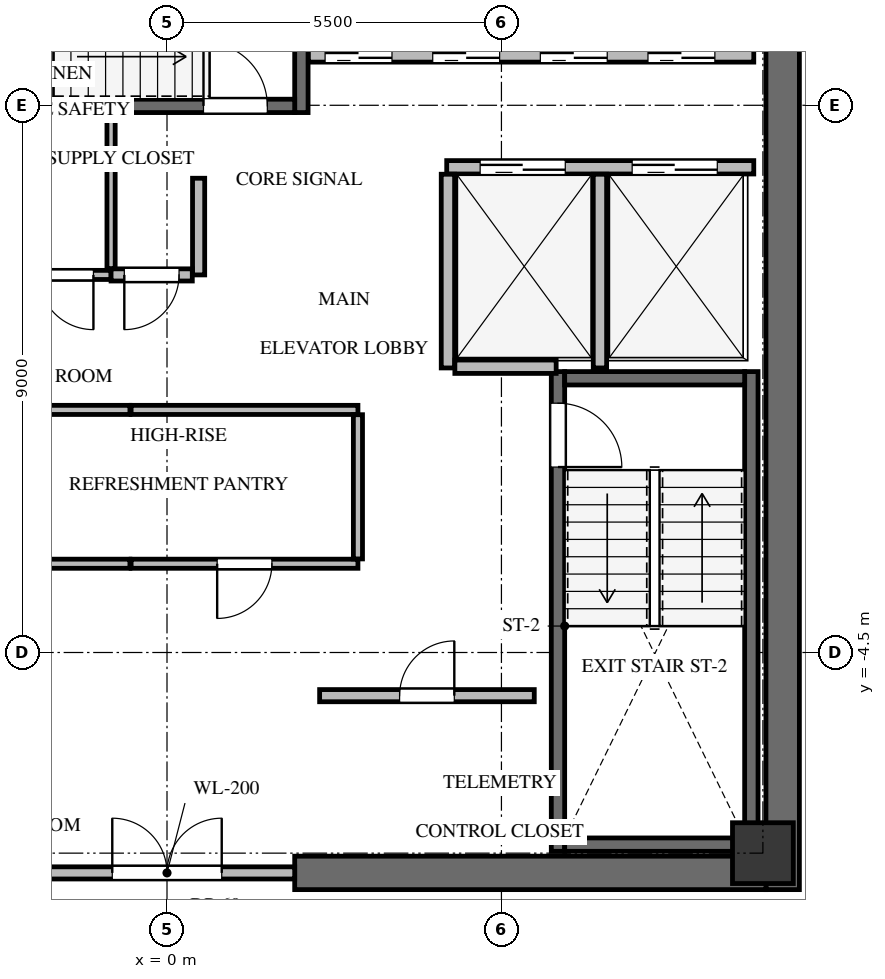
"""IFC4 building model, lengths in metres.
Left out: names, types, materials, properties, quantities, classifications, styles, units other than length and angle.
Written with IfcOpenShell. Run it as: python <this file> out.ifc"""

import sys

from ifc_helpers import new_model, si_unit, direction, frame, frame_2d, origin, origin_2d, place, context, subcontext, project, spatial, rectangle, extrude, source, transform, mapped, element, fill, save


model = new_model("IFC4")
c1 = context("Model", 3, precision=1e-05, world=origin(), true_north=direction((0.0, 1.0)))
c2 = subcontext(c1, "Body", "Model", "MODEL_VIEW")
j1 = project(units=[si_unit("LENGTHUNIT", "METRE"), si_unit("PLANEANGLEUNIT", "RADIAN")], contexts=[c1])
p1 = place(None, origin())
s1 = spatial("IfcSite", under=j1, at=p1, CompositionType="ELEMENT")
p2 = place(p1, origin())
s2 = spatial("IfcBuilding", under=s1, at=p2, CompositionType="ELEMENT")
p3 = place(p2, frame((0.0, 0.0, 234.8)))
s3 = spatial("IfcBuildingStorey", under=s2, at=p3, CompositionType="ELEMENT", Elevation=234.8)
p4 = place(p3, frame((10.125, -8.4, 0.0), z_axis=(0.0, 0.0, 1.0), x_axis=(0.0, 1.0, 0.0)))
e1 = element("IfcWall", 1, at=p4, inside=s3, PredefinedType="SHEAR", context=c2, shape_type="SweptSolid", body=[
    extrude(rectangle(XDim=16.8, YDim=0.55, at=frame_2d((8.4, 0.0))), origin(), (0.0, 0.0, 1.0), 3.3),
])
p5 = place(p3, frame((2.1, -8.125, 0.0), z_axis=(0.0, 0.0, 1.0), x_axis=(1.0, 0.0, 0.0)))
e2 = element("IfcWall", 2, at=p5, inside=s3, PredefinedType="SHEAR", context=c2, shape_type="SweptSolid", body=[
    extrude(rectangle(XDim=7.75, YDim=0.55, at=frame_2d((3.875, 0.0))), origin(), (0.0, 0.0, 1.0), 3.3),
])
p6 = place(p3, frame((9.61, -7.77, -0.24), z_axis=(0.0, 0.0, 1.0), x_axis=(0.0, 1.0, 0.0)))
e3 = element("IfcWall", 3, at=p6, inside=s3, PredefinedType="SHEAR", context=c2, shape_type="SweptSolid", body=[
    extrude(rectangle(XDim=7.89, YDim=0.22, at=frame_2d((3.945, 0.0))), origin(), (0.0, 0.0, 1.0), 3.3),
])
p7 = place(p3, frame((6.43, 0.12, -0.24), z_axis=(0.0, 0.0, 1.0), x_axis=(0.0, -1.0, 0.0)))
e4 = element("IfcWall", 4, at=p7, inside=s3, PredefinedType="SHEAR", context=c2, shape_type="SweptSolid", body=[
    extrude(rectangle(XDim=7.89, YDim=0.22, at=frame_2d((3.945, 0.0))), origin(), (0.0, 0.0, 1.0), 3.3),
])
p8 = place(p7, frame((0.52, 0.0, 0.0)))
e5 = element("IfcOpeningElement", 5, at=p8, cuts=e4, PredefinedType="OPENING", context=c2, shape_type="SweptSolid", body=[
    extrude(rectangle(XDim=1.05, YDim=2.15, at=frame_2d((0.525, 1.075))), frame((0.0, 0.12, 0.0), z_axis=(0.0, -1.0, 0.0), x_axis=(1.0, 0.0, 0.0)), (0.0, 0.0, 1.0), 0.24),
])
for number, where, z_axis, x_axis in (
    (6, (6.54, -7.66, -0.24), (0.0, 0.0, 1.0), (1.0, 0.0, 0.0)),
    (7, (9.5, 0.01, -0.24), (0.0, 0.0, 1.0), (-1.0, 0.0, 0.0)),
):
    element("IfcWall", number, at=place(p3, frame(where, z_axis=z_axis, x_axis=x_axis)), inside=s3, PredefinedType="SHEAR", context=c2, shape_type="SweptSolid", body=[
        extrude(rectangle(XDim=2.96, YDim=0.22, at=frame_2d((1.48, 0.0))), origin(), (0.0, 0.0, 1.0), 3.3),
    ])
p9 = place(p3, frame((2.21, 4.38, -0.24), z_axis=(0.0, 0.0, 1.0), x_axis=(0.0, 1.0, 0.0)))
e8 = element("IfcWall", 8, at=p9, inside=s3, PredefinedType="SHEAR", context=c2, shape_type="SweptSolid", body=[
    extrude(rectangle(XDim=3.4, YDim=0.22, at=frame_2d((1.7, 0.0))), origin(), (0.0, 0.0, 1.0), 3.3),
])
p10 = place(p3, frame((-5.25, 4.49, -0.24), z_axis=(0.0, 0.0, 1.0), x_axis=(1.0, 0.0, 0.0)))
e9 = element("IfcWall", 9, at=p10, inside=s3, PredefinedType="SHEAR", context=c2, shape_type="SweptSolid", body=[
    extrude(rectangle(XDim=7.35, YDim=0.22, at=frame_2d((3.675, 0.0))), origin(), (0.0, 0.0, 1.0), 3.3),
])
p11 = place(p10, frame((5.85, 0.0, 0.0)))
e10 = element("IfcOpeningElement", 10, at=p11, cuts=e9, PredefinedType="OPENING", context=c2, shape_type="SweptSolid", body=[
    extrude(rectangle(XDim=1.05, YDim=2.15, at=frame_2d((0.525, 1.075))), frame((0.0, 0.12, 0.0), z_axis=(0.0, -1.0, 0.0), x_axis=(1.0, 0.0, 0.0)), (0.0, 0.0, 1.0), 0.24),
])
m1 = source(origin(), c2, "Body", "SweptSolid", [
    extrude(rectangle(XDim=1.0, YDim=1.0, at=origin_2d()), origin(), (0.0, 0.0, 1.0), 3.3),
])
p12 = place(p3, frame((9.8, -7.8, -0.24), z_axis=(0.0, 0.0, 1.0), x_axis=(1.0, 0.0, 0.0)))
e11 = element("IfcColumn", 11, at=p12, inside=s3, PredefinedType="COLUMN", context=c2, shape_type="MappedRepresentation", body=[
    mapped(m1, transform((0.0, 0.0, 0.0), x_axis=(1.0, 0.0, 0.0), y_axis=(0.0, 1.0, 0.0), z_axis=(0.0, 0.0, 1.0), scale=1.0)),
])
p13 = place(p3, frame((-2.1, -8.125, 0.0), z_axis=(0.0, 0.0, 1.0), x_axis=(1.0, 0.0, 0.0)))
e12 = element("IfcWall", 12, at=p13, inside=s3, PredefinedType="SOLIDWALL", context=c2, shape_type="SweptSolid", body=[
    extrude(rectangle(XDim=4.2, YDim=0.2, at=frame_2d((2.1, 0.0))), origin(), (0.0, 0.0, 1.0), 3.045),
])
p14 = place(p13, frame((1.2, 0.0, 0.0)))
e13 = element("IfcOpeningElement", 13, at=p14, cuts=e12, PredefinedType="OPENING", context=c2, shape_type="SweptSolid", body=[
    extrude(rectangle(XDim=1.8, YDim=2.15, at=frame_2d((0.9, 1.075))), frame((0.0, 0.11, 0.0), z_axis=(0.0, -1.0, 0.0), x_axis=(1.0, 0.0, 0.0)), (0.0, 0.0, 1.0), 0.22),
])
p15 = place(p3, frame((4.6, 3.48, 0.0), z_axis=(0.0, 0.0, 1.0), x_axis=(1.0, 0.0, 0.0)))
e14 = element("IfcWall", 14, at=p15, inside=s3, PredefinedType="SOLIDWALL", context=c2, shape_type="SweptSolid", body=[
    extrude(rectangle(XDim=5.05, YDim=0.22, at=frame_2d((2.525, 0.0))), origin(), (0.0, 0.0, 1.0), 3.045),
])
p16 = place(p15, frame((0.55, 0.0, 0.0)))
e15 = element("IfcOpeningElement", 15, at=p16, cuts=e14, PredefinedType="OPENING", context=c2, shape_type="SweptSolid", body=[
    extrude(rectangle(XDim=1.4, YDim=2.15, at=frame_2d((0.7, 1.075))), frame((0.0, 0.12, 0.0), z_axis=(0.0, -1.0, 0.0), x_axis=(1.0, 0.0, 0.0)), (0.0, 0.0, 1.0), 0.24),
])
p17 = place(p15, frame((3.05, 0.0, 0.0)))
e16 = element("IfcOpeningElement", 16, at=p17, cuts=e14, PredefinedType="OPENING", context=c2, shape_type="SweptSolid", body=[
    extrude(rectangle(XDim=1.4, YDim=2.15, at=frame_2d((0.7, 1.075))), frame((0.0, 0.12, 0.0), z_axis=(0.0, -1.0, 0.0), x_axis=(1.0, 0.0, 0.0)), (0.0, 0.0, 1.0), 0.24),
])
for number, where, z_axis, x_axis in (
    (17, (4.62, 0.18, 0.0), (0.0, 0.0, 1.0), (0.0, 1.0, 0.0)),
    (18, (7.12, 0.18, 0.0), (0.0, 0.0, 1.0), (0.0, 1.0, 0.0)),
):
    element("IfcWall", number, at=place(p3, frame(where, z_axis=z_axis, x_axis=x_axis)), inside=s3, PredefinedType="SOLIDWALL", context=c2, shape_type="SweptSolid", body=[
        extrude(rectangle(XDim=3.186, YDim=0.22, at=frame_2d((1.593, 0.0))), origin(), (0.0, 0.0, 1.0), 3.045),
    ])
p18 = place(p3, frame((4.734, 0.2, 0.0), z_axis=(0.0, 0.0, 1.0), x_axis=(1.0, 0.0, 0.0)))
e19 = element("IfcWall", 19, at=p18, inside=s3, PredefinedType="SOLIDWALL", context=c2, shape_type="SweptSolid", body=[
    extrude(rectangle(XDim=1.666, YDim=0.22, at=frame_2d((0.833, 0.0))), origin(), (0.0, 0.0, 1.0), 3.045),
])
p19 = place(p3, frame((2.325, 5.32, 0.0), z_axis=(0.0, 0.0, 1.0), x_axis=(1.0, 0.0, 0.0)))
e20 = element("IfcWall", 20, at=p19, inside=s3, PredefinedType="SOLIDWALL", context=c2, shape_type="SweptSolid", body=[
    extrude(rectangle(XDim=7.325, YDim=0.22, at=frame_2d((3.663, 0.0))), origin(), (0.0, 0.0, 1.0), 3.045),
])
p20 = place(p19, frame((0.275, 0.0, 0.0)))
e21 = element("IfcOpeningElement", 21, at=p20, cuts=e20, PredefinedType="OPENING", context=c2, shape_type="SweptSolid", body=[
    extrude(rectangle(XDim=1.1, YDim=2.15, at=frame_2d((0.55, 1.075))), frame((0.0, 0.12, 0.0), z_axis=(0.0, -1.0, 0.0), x_axis=(1.0, 0.0, 0.0)), (0.0, 0.0, 1.0), 0.24),
])
p21 = place(p19, frame((2.045, 0.0, 0.0)))
e22 = element("IfcOpeningElement", 22, at=p21, cuts=e20, PredefinedType="OPENING", context=c2, shape_type="SweptSolid", body=[
    extrude(rectangle(XDim=1.1, YDim=2.15, at=frame_2d((0.55, 1.075))), frame((0.0, 0.12, 0.0), z_axis=(0.0, -1.0, 0.0), x_axis=(1.0, 0.0, 0.0)), (0.0, 0.0, 1.0), 0.24),
])
p22 = place(p19, frame((3.815, 0.0, 0.0)))
e23 = element("IfcOpeningElement", 23, at=p22, cuts=e20, PredefinedType="OPENING", context=c2, shape_type="SweptSolid", body=[
    extrude(rectangle(XDim=1.1, YDim=2.15, at=frame_2d((0.55, 1.075))), frame((0.0, 0.12, 0.0), z_axis=(0.0, -1.0, 0.0), x_axis=(1.0, 0.0, 0.0)), (0.0, 0.0, 1.0), 0.24),
])
p23 = place(p19, frame((5.585, 0.0, 0.0)))
e24 = element("IfcOpeningElement", 24, at=p23, cuts=e20, PredefinedType="OPENING", context=c2, shape_type="SweptSolid", body=[
    extrude(rectangle(XDim=1.1, YDim=2.15, at=frame_2d((0.55, 1.075))), frame((0.0, 0.12, 0.0), z_axis=(0.0, -1.0, 0.0), x_axis=(1.0, 0.0, 0.0)), (0.0, 0.0, 1.0), 0.24),
])
p24 = place(p3, frame((2.51, -5.21, 0.0), z_axis=(0.0, 0.0, 1.0), x_axis=(1.0, 0.0, 0.0)))
e25 = element("IfcWall", 25, at=p24, inside=s3, PredefinedType="SOLIDWALL", context=c2, shape_type="SweptSolid", body=[
    extrude(rectangle(XDim=3.53, YDim=0.2, at=frame_2d((1.765, 0.0))), origin(), (0.0, 0.0, 1.0), 3.045),
])
p25 = place(p24, frame((1.315, 0.0, 0.0)))
e26 = element("IfcOpeningElement", 26, at=p25, cuts=e25, PredefinedType="OPENING", context=c2, shape_type="SweptSolid", body=[
    extrude(rectangle(XDim=0.9, YDim=2.05, at=frame_2d((0.45, 1.025))), frame((0.0, 0.11, 0.0), z_axis=(0.0, -1.0, 0.0), x_axis=(1.0, 0.0, 0.0)), (0.0, 0.0, 1.0), 0.22),
])
p26 = place(p3, frame((-0.61, -3.04, 0.0), z_axis=(0.0, 0.0, 1.0), x_axis=(-1.0, 0.0, 0.0)))
e27 = element("IfcWall", 27, at=p26, inside=s3, PredefinedType="PARTITIONING", context=c2, shape_type="SweptSolid", body=[
    extrude(rectangle(XDim=3.73, YDim=0.15, at=frame_2d((1.865, 0.0))), origin(), (0.0, 0.0, 1.0), 3.045),
])
p27 = place(p26, frame((1.415, 0.0, 0.0)))
e28 = element("IfcOpeningElement", 28, at=p27, cuts=e27, PredefinedType="OPENING", context=c2, shape_type="SweptSolid", body=[
    extrude(rectangle(XDim=0.9, YDim=2.05, at=frame_2d((0.45, 1.025))), frame((0.0, 0.085, 0.0), z_axis=(0.0, -1.0, 0.0), x_axis=(1.0, 0.0, 0.0)), (0.0, 0.0, 1.0), 0.17),
])
p28 = place(p3, frame((-4.34, -0.51, 0.0), z_axis=(0.0, 0.0, 1.0), x_axis=(1.0, 0.0, 0.0)))
e29 = element("IfcWall", 29, at=p28, inside=s3, PredefinedType="PARTITIONING", context=c2, shape_type="SweptSolid", body=[
    extrude(rectangle(XDim=3.73, YDim=0.15, at=frame_2d((1.865, 0.0))), origin(), (0.0, 0.0, 1.0), 3.045),
])
p29 = place(p3, frame((3.14, -3.04, 0.0), z_axis=(0.0, 0.0, 1.0), x_axis=(-1.0, 0.0, 0.0)))
e30 = element("IfcWall", 30, at=p29, inside=s3, PredefinedType="PARTITIONING", context=c2, shape_type="SweptSolid", body=[
    extrude(rectangle(XDim=3.73, YDim=0.15, at=frame_2d((1.865, 0.0))), origin(), (0.0, 0.0, 1.0), 3.045),
])
p30 = place(p29, frame((1.415, 0.0, 0.0)))
e31 = element("IfcOpeningElement", 31, at=p30, cuts=e30, PredefinedType="OPENING", context=c2, shape_type="SweptSolid", body=[
    extrude(rectangle(XDim=0.9, YDim=2.05, at=frame_2d((0.45, 1.025))), frame((0.0, 0.085, 0.0), z_axis=(0.0, -1.0, 0.0), x_axis=(1.0, 0.0, 0.0)), (0.0, 0.0, 1.0), 0.17),
])
p31 = place(p3, frame((-0.59, -0.51, 0.0), z_axis=(0.0, 0.0, 1.0), x_axis=(1.0, 0.0, 0.0)))
e32 = element("IfcWall", 32, at=p31, inside=s3, PredefinedType="PARTITIONING", context=c2, shape_type="SweptSolid", body=[
    extrude(rectangle(XDim=3.73, YDim=0.15, at=frame_2d((1.865, 0.0))), origin(), (0.0, 0.0, 1.0), 3.045),
])
p32 = place(p3, frame((3.14, -0.589, 0.0), z_axis=(0.0, 0.0, 1.0), x_axis=(0.0, -1.0, 0.0)))
e33 = element("IfcWall", 33, at=p32, inside=s3, PredefinedType="PARTITIONING", context=c2, shape_type="SweptSolid", body=[
    extrude(rectangle(XDim=2.372, YDim=0.15, at=frame_2d((1.186, 0.0))), origin(), (0.0, 0.0, 1.0), 3.045),
])
p33 = place(p3, frame((-0.92, 1.71, 0.0), z_axis=(0.0, 0.0, 1.0), x_axis=(-1.0, 0.0, 0.0)))
e34 = element("IfcWall", 34, at=p33, inside=s3, PredefinedType="PARTITIONING", context=c2, shape_type="SweptSolid", body=[
    extrude(rectangle(XDim=1.48, YDim=0.15, at=frame_2d((0.74, 0.0))), origin(), (0.0, 0.0, 1.0), 3.045),
])
p34 = place(p33, frame((0.29, 0.0, 0.0)))
e35 = element("IfcOpeningElement", 35, at=p34, cuts=e34, PredefinedType="OPENING", context=c2, shape_type="SweptSolid", body=[
    extrude(rectangle(XDim=0.9, YDim=2.05, at=frame_2d((0.45, 1.025))), frame((0.0, 0.085, 0.0), z_axis=(0.0, -1.0, 0.0), x_axis=(1.0, 0.0, 0.0)), (0.0, 0.0, 1.0), 0.17),
])
p35 = place(p3, frame((0.52, 3.3, 0.0), z_axis=(0.0, 0.0, 1.0), x_axis=(0.0, -1.0, 0.0)))
e36 = element("IfcWall", 36, at=p35, inside=s3, PredefinedType="SOLIDWALL", context=c2, shape_type="SweptSolid", body=[
    extrude(rectangle(XDim=1.59, YDim=0.2, at=frame_2d((0.795, 0.0))), origin(), (0.0, 0.0, 1.0), 3.045),
])
p36 = place(p3, frame((0.416, 1.71, 0.0), z_axis=(0.0, 0.0, 1.0), x_axis=(-1.0, 0.0, 0.0)))
e37 = element("IfcWall", 37, at=p36, inside=s3, PredefinedType="SOLIDWALL", context=c2, shape_type="SweptSolid", body=[
    extrude(rectangle(XDim=1.336, YDim=0.2, at=frame_2d((0.668, 0.0))), origin(), (0.0, 0.0, 1.0), 3.045),
])
p37 = place(p36, frame((0.218, 0.0, 0.0)))
e38 = element("IfcOpeningElement", 38, at=p37, cuts=e37, PredefinedType="OPENING", context=c2, shape_type="SweptSolid", body=[
    extrude(rectangle(XDim=0.9, YDim=2.05, at=frame_2d((0.45, 1.025))), frame((0.0, 0.11, 0.0), z_axis=(0.0, -1.0, 0.0), x_axis=(1.0, 0.0, 0.0)), (0.0, 0.0, 1.0), 0.22),
])
p38 = place(p3, frame((-0.92, 4.375, 0.0), z_axis=(0.0, 0.0, 1.0), x_axis=(0.0, -1.0, 0.0)))
e39 = element("IfcWall", 39, at=p38, inside=s3, PredefinedType="PARTITIONING", context=c2, shape_type="SweptSolid", body=[
    extrude(rectangle(XDim=2.561, YDim=0.135, at=frame_2d((1.281, 0.0))), origin(), (0.0, 0.0, 1.0), 3.045),
])
m2 = source(origin(), c2, "Body", "SweptSolid", [
    extrude(rectangle(XDim=1.05, YDim=2.15, at=frame_2d((0.525, 1.075))), frame((0.0, 0.025, 0.0), z_axis=(0.0, -1.0, 0.0), x_axis=(1.0, 0.0, 0.0)), (0.0, 0.0, 1.0), 0.05),
])
p39 = place(p8, origin())
e40 = element("IfcDoor", 40, at=p39, inside=s3, OperationType="SINGLE_SWING_RIGHT", PredefinedType="DOOR", context=c2, shape_type="MappedRepresentation", body=[
    mapped(m2, transform((0.0, 0.0, 0.0), x_axis=(1.0, 0.0, 0.0), y_axis=(0.0, 1.0, 0.0), z_axis=(0.0, 0.0, 1.0), scale=1.0)),
])
fill(e5, e40)
m3 = source(origin(), c2, "Body", "SweptSolid", [
    extrude(rectangle(XDim=1.05, YDim=2.15, at=frame_2d((0.525, 1.075))), frame((0.0, 0.025, 0.0), z_axis=(0.0, -1.0, 0.0), x_axis=(1.0, 0.0, 0.0)), (0.0, 0.0, 1.0), 0.05),
])
p40 = place(p11, origin())
e41 = element("IfcDoor", 41, at=p40, inside=s3, OperationType="SINGLE_SWING_LEFT", PredefinedType="DOOR", context=c2, shape_type="MappedRepresentation", body=[
    mapped(m3, transform((0.0, 0.0, 0.0), x_axis=(1.0, 0.0, 0.0), y_axis=(0.0, 1.0, 0.0), z_axis=(0.0, 0.0, 1.0), scale=1.0)),
])
fill(e10, e41)
m4 = source(origin(), c2, "Body", "SweptSolid", [
    extrude(rectangle(XDim=1.8, YDim=2.15, at=frame_2d((0.9, 1.075))), frame((0.0, 0.025, 0.0), z_axis=(0.0, -1.0, 0.0), x_axis=(1.0, 0.0, 0.0)), (0.0, 0.0, 1.0), 0.05),
])
p41 = place(p14, origin())
e42 = element("IfcDoor", 42, at=p41, inside=s3, OperationType="DOUBLE_DOOR_SINGLE_SWING", PredefinedType="DOOR", context=c2, shape_type="MappedRepresentation", body=[
    mapped(m4, transform((0.0, 0.0, 0.0), x_axis=(1.0, 0.0, 0.0), y_axis=(0.0, 1.0, 0.0), z_axis=(0.0, 0.0, 1.0), scale=1.0)),
])
fill(e13, e42)
m5 = source(origin(), c2, "Body", "SweptSolid", [
    extrude(rectangle(XDim=1.4, YDim=2.15, at=frame_2d((0.7, 1.075))), frame((0.0, 0.025, 0.0), z_axis=(0.0, -1.0, 0.0), x_axis=(1.0, 0.0, 0.0)), (0.0, 0.0, 1.0), 0.05),
])
p42 = place(p16, origin())
e43 = element("IfcDoor", 43, at=p42, inside=s3, OperationType="DOUBLE_DOOR_SLIDING", PredefinedType="DOOR", context=c2, shape_type="MappedRepresentation", body=[
    mapped(m5, transform((0.0, 0.0, 0.0), x_axis=(1.0, 0.0, 0.0), y_axis=(0.0, 1.0, 0.0), z_axis=(0.0, 0.0, 1.0), scale=1.0)),
])
fill(e15, e43)
p43 = place(p17, origin())
e44 = element("IfcDoor", 44, at=p43, inside=s3, OperationType="DOUBLE_DOOR_SLIDING", PredefinedType="DOOR", context=c2, shape_type="MappedRepresentation", body=[
    mapped(m5, transform((0.0, 0.0, 0.0), x_axis=(1.0, 0.0, 0.0), y_axis=(0.0, 1.0, 0.0), z_axis=(0.0, 0.0, 1.0), scale=1.0)),
])
fill(e16, e44)
m6 = source(origin(), c2, "Body", "SweptSolid", [
    extrude(rectangle(XDim=1.1, YDim=2.15, at=frame_2d((0.55, 1.075))), frame((0.0, 0.025, 0.0), z_axis=(0.0, -1.0, 0.0), x_axis=(1.0, 0.0, 0.0)), (0.0, 0.0, 1.0), 0.05),
])
p44 = place(p20, origin())
e45 = element("IfcDoor", 45, at=p44, inside=s3, OperationType="DOUBLE_DOOR_SLIDING", PredefinedType="DOOR", context=c2, shape_type="MappedRepresentation", body=[
    mapped(m6, transform((0.0, 0.0, 0.0), x_axis=(1.0, 0.0, 0.0), y_axis=(0.0, 1.0, 0.0), z_axis=(0.0, 0.0, 1.0), scale=1.0)),
])
fill(e21, e45)
p45 = place(p21, origin())
e46 = element("IfcDoor", 46, at=p45, inside=s3, OperationType="DOUBLE_DOOR_SLIDING", PredefinedType="DOOR", context=c2, shape_type="MappedRepresentation", body=[
    mapped(m6, transform((0.0, 0.0, 0.0), x_axis=(1.0, 0.0, 0.0), y_axis=(0.0, 1.0, 0.0), z_axis=(0.0, 0.0, 1.0), scale=1.0)),
])
fill(e22, e46)
p46 = place(p22, origin())
e47 = element("IfcDoor", 47, at=p46, inside=s3, OperationType="DOUBLE_DOOR_SLIDING", PredefinedType="DOOR", context=c2, shape_type="MappedRepresentation", body=[
    mapped(m6, transform((0.0, 0.0, 0.0), x_axis=(1.0, 0.0, 0.0), y_axis=(0.0, 1.0, 0.0), z_axis=(0.0, 0.0, 1.0), scale=1.0)),
])
fill(e23, e47)
p47 = place(p23, origin())
e48 = element("IfcDoor", 48, at=p47, inside=s3, OperationType="DOUBLE_DOOR_SLIDING", PredefinedType="DOOR", context=c2, shape_type="MappedRepresentation", body=[
    mapped(m6, transform((0.0, 0.0, 0.0), x_axis=(1.0, 0.0, 0.0), y_axis=(0.0, 1.0, 0.0), z_axis=(0.0, 0.0, 1.0), scale=1.0)),
])
fill(e24, e48)
m7 = source(origin(), c2, "Body", "SweptSolid", [
    extrude(rectangle(XDim=0.9, YDim=2.05, at=frame_2d((0.45, 1.025))), frame((0.0, 0.025, 0.0), z_axis=(0.0, -1.0, 0.0), x_axis=(1.0, 0.0, 0.0)), (0.0, 0.0, 1.0), 0.05),
])
p48 = place(p25, origin())
e49 = element("IfcDoor", 49, at=p48, inside=s3, OperationType="SINGLE_SWING_RIGHT", PredefinedType="DOOR", context=c2, shape_type="MappedRepresentation", body=[
    mapped(m7, transform((0.0, 0.0, 0.0), x_axis=(1.0, 0.0, 0.0), y_axis=(0.0, 1.0, 0.0), z_axis=(0.0, 0.0, 1.0), scale=1.0)),
])
fill(e26, e49)
p49 = place(p30, origin())
e50 = element("IfcDoor", 50, at=p49, inside=s3, OperationType="SINGLE_SWING_RIGHT", PredefinedType="DOOR", context=c2, shape_type="MappedRepresentation", body=[
    mapped(m7, transform((0.0, 0.0, 0.0), x_axis=(1.0, 0.0, 0.0), y_axis=(0.0, 1.0, 0.0), z_axis=(0.0, 0.0, 1.0), scale=1.0)),
])
fill(e31, e50)
m8 = source(origin(), c2, "Body", "SweptSolid", [
    extrude(rectangle(XDim=0.9, YDim=2.05, at=frame_2d((0.45, 1.025))), frame((0.0, 0.025, 0.0), z_axis=(0.0, -1.0, 0.0), x_axis=(1.0, 0.0, 0.0)), (0.0, 0.0, 1.0), 0.05),
])
p50 = place(p34, origin())
e51 = element("IfcDoor", 51, at=p50, inside=s3, OperationType="SINGLE_SWING_LEFT", PredefinedType="DOOR", context=c2, shape_type="MappedRepresentation", body=[
    mapped(m8, transform((0.0, 0.0, 0.0), x_axis=(1.0, 0.0, 0.0), y_axis=(0.0, 1.0, 0.0), z_axis=(0.0, 0.0, 1.0), scale=1.0)),
])
fill(e35, e51)
p51 = place(p37, origin())
e52 = element("IfcDoor", 52, at=p51, inside=s3, OperationType="SINGLE_SWING_RIGHT", PredefinedType="DOOR", context=c2, shape_type="MappedRepresentation", body=[
    mapped(m7, transform((0.0, 0.0, 0.0), x_axis=(1.0, 0.0, 0.0), y_axis=(0.0, 1.0, 0.0), z_axis=(0.0, 0.0, 1.0), scale=1.0)),
])
fill(e38, e52)
save(model, sys.argv[1])
